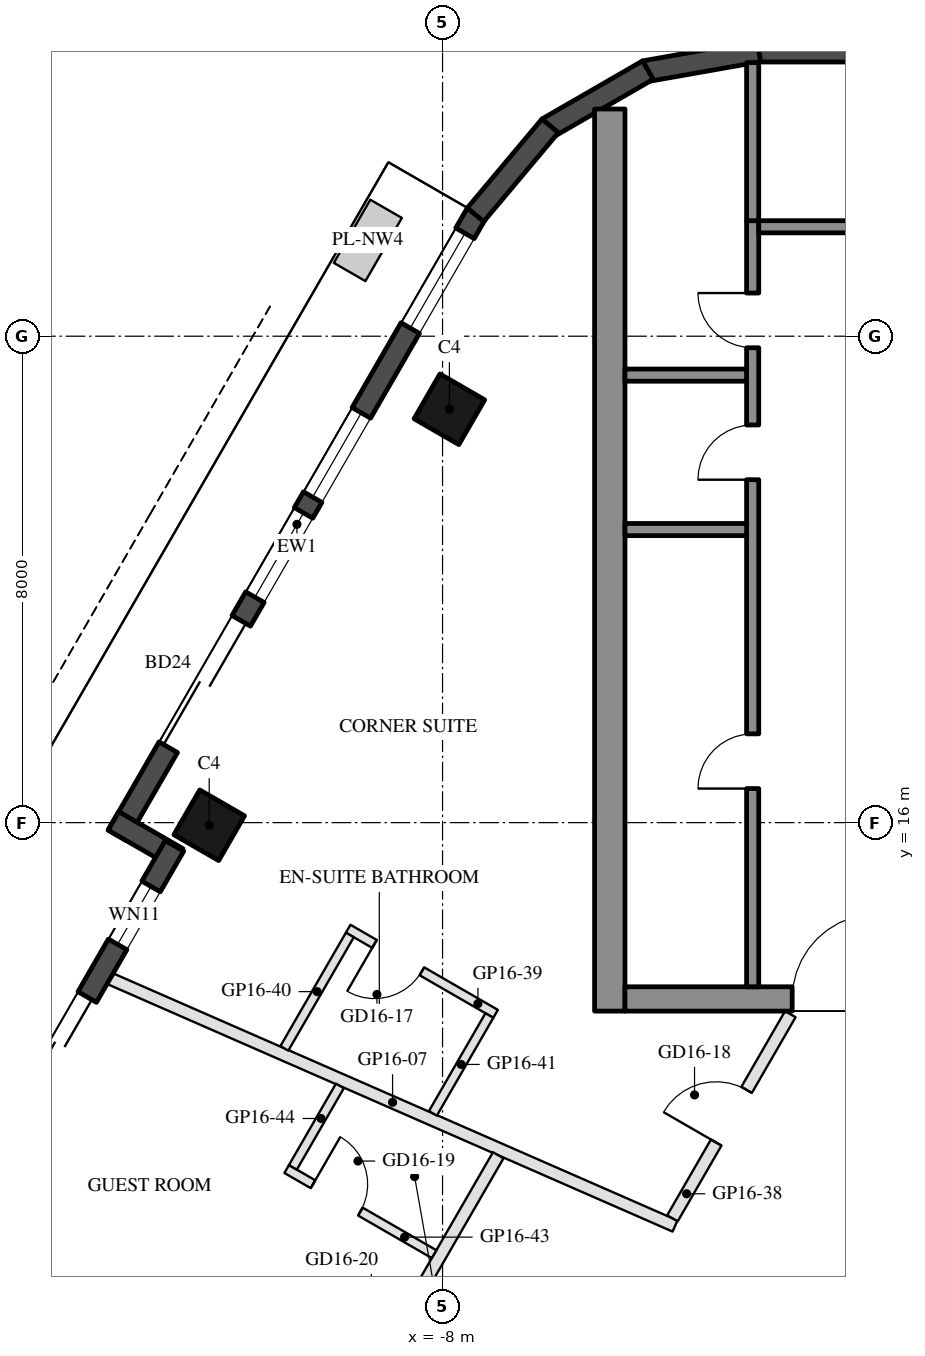
"""IFC4 building model, lengths in metres.
Left out: names, types, materials, properties, quantities, classifications, styles, units other than length and angle.
Written with IfcOpenShell. Run it as: python <this file> out.ifc"""

import sys

from ifc_helpers import new_model, si_unit, direction, frame, frame_2d, origin, origin_2d, place, context, subcontext, project, spatial, rectangle, hollow_rectangle, extrude, element, fill, save


model = new_model("IFC4")
c1 = context("Model", 3, precision=1e-05, world=origin(), true_north=direction((0.0, 1.0)))
c2 = subcontext(c1, "Body", "Model", "MODEL_VIEW")
j1 = project(units=[si_unit("LENGTHUNIT", "METRE"), si_unit("PLANEANGLEUNIT", "RADIAN")], contexts=[c1])
p1 = place(None, origin())
s1 = spatial("IfcSite", under=j1, at=p1, CompositionType="ELEMENT")
p2 = place(p1, origin())
s2 = spatial("IfcBuilding", under=s1, at=p2, CompositionType="ELEMENT")
p3 = place(p2, frame((0.0, 0.0, 179.9)))
s3 = spatial("IfcBuildingStorey", under=s2, at=p3, CompositionType="ELEMENT", Elevation=179.9)
for number, where, z_axis, x_axis in (
    (1, (-7.888, 22.798, 0.0), (0.0, 0.0, 1.0), (0.5, 0.866, 0.0)),
    (2, (-11.838, 15.957, 0.0), (0.0, 0.0, 1.0), (0.5, 0.866, 0.0)),
):
    element("IfcColumn", number, at=place(p3, frame(where, z_axis=z_axis, x_axis=x_axis)), inside=s3, PredefinedType="COLUMN", context=c2, shape_type="SweptSolid", body=[
        extrude(hollow_rectangle(XDim=0.85, YDim=0.85, WallThickness=0.04, at=origin_2d()), origin(), (0.0, 0.0, 1.0), 3.7),
    ])
p4 = place(p3, frame((-7.441, 26.022, 0.0), z_axis=(0.0, 0.0, 1.0), x_axis=(-0.499992533062, -0.86602971478, 0.0)))
e3 = element("IfcWall", 3, at=p4, inside=s3, PredefinedType="SOLIDWALL", context=c2, shape_type="SweptSolid", body=[
    extrude(rectangle(XDim=11.816, YDim=0.35, at=frame_2d((5.908, 0.0))), origin(), (0.0, 0.0, 1.0), 3.55),
])
p5 = place(p4, frame((0.381, 0.0, 0.3)))
e4 = element("IfcOpeningElement", 4, at=p5, cuts=e3, PredefinedType="OPENING", context=c2, shape_type="SweptSolid", body=[
    extrude(rectangle(XDim=1.8, YDim=2.65, at=frame_2d((0.9, 1.325))), frame((0.0, 0.185, 0.0), z_axis=(0.0, -1.0, 0.0), x_axis=(1.0, 0.0, 0.0)), (0.0, 0.0, 1.0), 0.37),
])
p6 = place(p4, frame((7.74, 0.0, 0.0)))
e5 = element("IfcOpeningElement", 5, at=p6, cuts=e3, PredefinedType="OPENING", context=c2, shape_type="SweptSolid", body=[
    extrude(rectangle(XDim=2.4, YDim=2.4, at=frame_2d((1.2, 1.2))), frame((0.0, 0.185, 0.0), z_axis=(0.0, -1.0, 0.0), x_axis=(1.0, 0.0, 0.0)), (0.0, 0.0, 1.0), 0.37),
])
p7 = place(p4, frame((3.791, 0.0, 0.3)))
e6 = element("IfcOpeningElement", 6, at=p7, cuts=e3, PredefinedType="OPENING", context=c2, shape_type="SweptSolid", body=[
    extrude(rectangle(XDim=1.6, YDim=2.65, at=frame_2d((0.8, 1.325))), frame((0.0, 0.185, 0.0), z_axis=(0.0, -1.0, 0.0), x_axis=(1.0, 0.0, 0.0)), (0.0, 0.0, 1.0), 0.37),
])
p8 = place(p4, frame((5.691, 0.0, 0.3)))
e7 = element("IfcOpeningElement", 7, at=p8, cuts=e3, PredefinedType="OPENING", context=c2, shape_type="SweptSolid", body=[
    extrude(rectangle(XDim=1.6, YDim=2.65, at=frame_2d((0.8, 1.325))), frame((0.0, 0.185, 0.0), z_axis=(0.0, -1.0, 0.0), x_axis=(1.0, 0.0, 0.0)), (0.0, 0.0, 1.0), 0.37),
])
p9 = place(p3, frame((-13.413, 16.029, 0.0), z_axis=(0.0, 0.0, 1.0), x_axis=(0.866005645448, -0.500034220881, 0.0)))
e8 = element("IfcWall", 8, at=p9, inside=s3, PredefinedType="SOLIDWALL", context=c2, shape_type="SweptSolid", body=[
    extrude(rectangle(XDim=1.22, YDim=0.35, at=frame_2d((0.61, 0.0))), origin(), (0.0, 0.0, 1.0), 3.55),
])
p10 = place(p3, frame((-12.409, 15.617, 0.0), z_axis=(0.0, 0.0, 1.0), x_axis=(-0.500003597184, -0.866023326939, 0.0)))
e9 = element("IfcWall", 9, at=p10, inside=s3, PredefinedType="SOLIDWALL", context=c2, shape_type="SweptSolid", body=[
    extrude(rectangle(XDim=6.74, YDim=0.35, at=frame_2d((3.37, 0.0))), origin(), (0.0, 0.0, 1.0), 3.55),
])
p11 = place(p10, frame((0.77, 0.0, 0.3)))
e10 = element("IfcOpeningElement", 10, at=p11, cuts=e9, PredefinedType="OPENING", context=c2, shape_type="SweptSolid", body=[
    extrude(rectangle(XDim=1.1, YDim=2.65, at=frame_2d((0.55, 1.325))), frame((0.0, 0.185, 0.0), z_axis=(0.0, -1.0, 0.0), x_axis=(1.0, 0.0, 0.0)), (0.0, 0.0, 1.0), 0.37),
])
p12 = place(p10, frame((2.87, 0.0, 0.0)))
e11 = element("IfcOpeningElement", 11, at=p12, cuts=e9, PredefinedType="OPENING", context=c2, shape_type="SweptSolid", body=[
    extrude(rectangle(XDim=1.8, YDim=2.4, at=frame_2d((0.9, 1.2))), frame((0.0, 0.185, 0.0), z_axis=(0.0, -1.0, 0.0), x_axis=(1.0, 0.0, 0.0)), (0.0, 0.0, 1.0), 0.37),
])
p13 = place(p10, frame((4.97, 0.0, 0.3)))
e12 = element("IfcOpeningElement", 12, at=p13, cuts=e9, PredefinedType="OPENING", context=c2, shape_type="SweptSolid", body=[
    extrude(rectangle(XDim=1.0, YDim=2.65, at=frame_2d((0.5, 1.325))), frame((0.0, 0.185, 0.0), z_axis=(0.0, -1.0, 0.0), x_axis=(1.0, 0.0, 0.0)), (0.0, 0.0, 1.0), 0.37),
])
p14 = place(p3, frame((2.829, 28.685, 0.0), z_axis=(0.0, 0.0, 1.0), x_axis=(-1.0, 0.0, 0.0)))
e13 = element("IfcWall", 13, at=p14, inside=s3, PredefinedType="SOLIDWALL", context=c2, shape_type="SweptSolid", body=[
    extrude(rectangle(XDim=5.658, YDim=0.35, at=frame_2d((2.829, 0.0))), origin(), (0.0, 0.0, 1.0), 3.55),
])
for number, where, z_axis, x_axis in (
    (14, (-2.799, 28.688, 0.0), (0.0, 0.0, 1.0), (-0.985, -0.174, 0.0)),
    (15, (-4.623, 28.377, 0.0), (0.0, 0.0, 1.0), (-0.866, -0.5, 0.0)),
):
    element("IfcWall", number, at=place(p3, frame(where, z_axis=z_axis, x_axis=x_axis)), inside=s3, PredefinedType="SOLIDWALL", context=c2, shape_type="SweptSolid", body=[
        extrude(rectangle(XDim=1.91, YDim=0.35, at=frame_2d((0.955, 0.0))), origin(), (0.0, 0.0, 1.0), 3.55),
    ])
p15 = place(p3, frame((-6.23, 27.461, 0.0), z_axis=(0.0, 0.0, 1.0), x_axis=(-0.642808304945, -0.766027077259, 0.0)))
e16 = element("IfcWall", 16, at=p15, inside=s3, PredefinedType="SOLIDWALL", context=c2, shape_type="SweptSolid", body=[
    extrude(rectangle(XDim=1.91, YDim=0.35, at=frame_2d((0.955, 0.0))), origin(), (0.0, 0.0, 1.0), 3.55),
])
p16 = place(p3, frame((-5.25, 12.9, 0.0), z_axis=(0.0, 0.0, 1.0), x_axis=(0.0, 1.0, 0.0)))
e17 = element("IfcWall", 17, at=p16, inside=s3, PredefinedType="SHEAR", context=c2, shape_type="SweptSolid", body=[
    extrude(rectangle(XDim=14.837, YDim=0.5, at=frame_2d((7.418, 0.0))), origin(), (0.0, 0.0, 1.0), 3.5),
])
p17 = place(p3, frame((5.0, 13.1, 0.0), z_axis=(0.0, 0.0, 1.0), x_axis=(-1.0, 0.0, 0.0)))
e18 = element("IfcWall", 18, at=p17, inside=s3, PredefinedType="SHEAR", context=c2, shape_type="SweptSolid", body=[
    extrude(rectangle(XDim=10.0, YDim=0.4, at=frame_2d((5.0, 0.0))), origin(), (0.0, 0.0, 1.0), 3.5),
])
p18 = place(p17, frame((3.55, 0.0, 0.0)))
e19 = element("IfcOpeningElement", 19, at=p18, cuts=e18, PredefinedType="OPENING", context=c2, shape_type="SweptSolid", body=[
    extrude(rectangle(XDim=1.1, YDim=2.1, at=frame_2d((0.55, 1.05))), frame((0.0, 0.21, 0.0), z_axis=(0.0, -1.0, 0.0), x_axis=(1.0, 0.0, 0.0)), (0.0, 0.0, 1.0), 0.42),
])
p19 = place(p17, frame((5.85, 0.0, 0.0)))
e20 = element("IfcOpeningElement", 20, at=p19, cuts=e18, PredefinedType="OPENING", context=c2, shape_type="SweptSolid", body=[
    extrude(rectangle(XDim=1.4, YDim=2.1, at=frame_2d((0.7, 1.05))), frame((0.0, 0.21, 0.0), z_axis=(0.0, -1.0, 0.0), x_axis=(1.0, 0.0, 0.0)), (0.0, 0.0, 1.0), 0.42),
])
p20 = place(p3, frame((-2.9, 13.3, 0.0), z_axis=(0.0, 0.0, 1.0), x_axis=(0.0, 1.0, 0.0)))
e21 = element("IfcWall", 21, at=p20, inside=s3, PredefinedType="SHEAR", context=c2, shape_type="SweptSolid", body=[
    extrude(rectangle(XDim=12.6, YDim=0.2, at=frame_2d((6.3, 0.0))), origin(), (0.0, 0.0, 1.0), 3.5),
])
p21 = place(p20, frame((3.26, 0.0, 0.0)))
e22 = element("IfcOpeningElement", 22, at=p21, cuts=e21, PredefinedType="OPENING", context=c2, shape_type="SweptSolid", body=[
    extrude(rectangle(XDim=0.9, YDim=2.1, at=frame_2d((0.45, 1.05))), frame((0.0, 0.11, 0.0), z_axis=(0.0, -1.0, 0.0), x_axis=(1.0, 0.0, 0.0)), (0.0, 0.0, 1.0), 0.22),
])
p22 = place(p20, frame((8.34, 0.0, 0.0)))
e23 = element("IfcOpeningElement", 23, at=p22, cuts=e21, PredefinedType="OPENING", context=c2, shape_type="SweptSolid", body=[
    extrude(rectangle(XDim=0.9, YDim=2.1, at=frame_2d((0.45, 1.05))), frame((0.0, 0.11, 0.0), z_axis=(0.0, -1.0, 0.0), x_axis=(1.0, 0.0, 0.0)), (0.0, 0.0, 1.0), 0.22),
])
p23 = place(p20, frame((10.51, 0.0, 0.0)))
e24 = element("IfcOpeningElement", 24, at=p23, cuts=e21, PredefinedType="OPENING", context=c2, shape_type="SweptSolid", body=[
    extrude(rectangle(XDim=0.9, YDim=2.1, at=frame_2d((0.45, 1.05))), frame((0.0, 0.11, 0.0), z_axis=(0.0, -1.0, 0.0), x_axis=(1.0, 0.0, 0.0)), (0.0, 0.0, 1.0), 0.22),
])
p24 = place(p3, frame((-0.4, 25.8, 0.0), z_axis=(0.0, 0.0, 1.0), x_axis=(-1.0, 0.0, 0.0)))
e25 = element("IfcWall", 25, at=p24, inside=s3, PredefinedType="SHEAR", context=c2, shape_type="SweptSolid", body=[
    extrude(rectangle(XDim=2.4, YDim=0.2, at=frame_2d((1.2, 0.0))), origin(), (0.0, 0.0, 1.0), 3.5),
])
for number, where, z_axis, x_axis in (
    (26, (-3.0, 20.82, 0.0), (0.0, 0.0, 1.0), (-1.0, 0.0, 0.0)),
    (27, (-3.0, 23.36, 0.0), (0.0, 0.0, 1.0), (-1.0, 0.0, 0.0)),
):
    element("IfcWall", number, at=place(p3, frame(where, z_axis=z_axis, x_axis=x_axis)), inside=s3, PredefinedType="SHEAR", context=c2, shape_type="SweptSolid", body=[
        extrude(rectangle(XDim=2.0, YDim=0.2, at=frame_2d((1.0, 0.0))), origin(), (0.0, 0.0, 1.0), 3.5),
    ])
p25 = place(p3, frame((-2.9, 25.9, 0.0), z_axis=(0.0, 0.0, 1.0), x_axis=(0.0, 1.0, 0.0)))
e28 = element("IfcWall", 28, at=p25, inside=s3, PredefinedType="SHEAR", context=c2, shape_type="SweptSolid", body=[
    extrude(rectangle(XDim=2.6, YDim=0.2, at=frame_2d((1.3, 0.0))), origin(), (0.0, 0.0, 1.0), 3.5),
])
p26 = place(p3, frame((-13.467, 13.434, 0.0), z_axis=(0.0, 0.0, 1.0), x_axis=(0.916026348045, -0.401118099426, 0.0)))
e29 = element("IfcWall", 29, at=p26, inside=s3, PredefinedType="PARTITIONING", context=c2, shape_type="SweptSolid", body=[
    extrude(rectangle(XDim=10.142, YDim=0.2, at=frame_2d((5.071, 0.0))), origin(), (0.0, 0.0, 1.0), 3.06),
])
p27 = place(p3, frame((-15.44, 8.867, 0.0), z_axis=(0.0, 0.0, 1.0), x_axis=(0.851787104886, -0.523888087237, 0.0)))
e30 = element("IfcWall", 30, at=p27, inside=s3, PredefinedType="PARTITIONING", context=c2, shape_type="SweptSolid", body=[
    extrude(rectangle(XDim=6.508, YDim=0.2, at=frame_2d((3.254, 0.0))), origin(), (0.0, 0.0, 1.0), 2.95),
])
p28 = place(p3, frame((-4.219, 9.493, 0.0), z_axis=(0.0, 0.0, 1.0), x_axis=(0.499993219391, 0.866029318535, 0.0)))
e31 = element("IfcWall", 31, at=p28, inside=s3, PredefinedType="PARTITIONING", context=c2, shape_type="SweptSolid", body=[
    extrude(rectangle(XDim=3.876, YDim=0.2, at=frame_2d((1.938, 0.0))), origin(), (0.0, 0.0, 1.0), 2.95),
])
p29 = place(p28, frame((1.438, 0.0, 0.0)))
e32 = element("IfcOpeningElement", 32, at=p29, cuts=e31, PredefinedType="OPENING", context=c2, shape_type="SweptSolid", body=[
    extrude(rectangle(XDim=1.0, YDim=2.1, at=frame_2d((0.5, 1.05))), frame((0.0, 0.11, 0.0), z_axis=(0.0, -1.0, 0.0), x_axis=(1.0, 0.0, 0.0)), (0.0, 0.0, 1.0), 0.22),
])
p30 = place(p3, frame((-7.127, 12.855, 0.0), z_axis=(0.0, 0.0, 1.0), x_axis=(-0.866018616679, 0.500011755427, 0.0)))
e33 = element("IfcWall", 33, at=p30, inside=s3, PredefinedType="PARTITIONING", context=c2, shape_type="SweptSolid", body=[
    extrude(rectangle(XDim=2.8, YDim=0.15, at=frame_2d((1.4, 0.0))), origin(), (0.0, 0.0, 1.0), 3.55),
])
p31 = place(p30, frame((1.4, 0.0, 0.0)))
e34 = element("IfcOpeningElement", 34, at=p31, cuts=e33, PredefinedType="OPENING", context=c2, shape_type="SweptSolid", body=[
    extrude(rectangle(XDim=0.9, YDim=2.1, at=frame_2d((0.45, 1.05))), frame((0.0, 0.085, 0.0), z_axis=(0.0, -1.0, 0.0), x_axis=(1.0, 0.0, 0.0)), (0.0, 0.0, 1.0), 0.17),
])
p32 = place(p3, frame((-9.525, 14.153, 0.0), z_axis=(0.0, 0.0, 1.0), x_axis=(-0.500016891966, -0.866015650984, 0.0)))
e35 = element("IfcWall", 35, at=p32, inside=s3, PredefinedType="PARTITIONING", context=c2, shape_type="SweptSolid", body=[
    extrude(rectangle(XDim=2.153, YDim=0.15, at=frame_2d((1.077, 0.0))), origin(), (0.0, 0.0, 1.0), 3.55),
])
p33 = place(p3, frame((-7.23, 12.828, 0.0), z_axis=(0.0, 0.0, 1.0), x_axis=(-0.500010545262, -0.866019315389, 0.0)))
e36 = element("IfcWall", 36, at=p33, inside=s3, PredefinedType="PARTITIONING", context=c2, shape_type="SweptSolid", body=[
    extrude(rectangle(XDim=1.858, YDim=0.15, at=frame_2d((0.929, 0.0))), origin(), (0.0, 0.0, 1.0), 3.55),
])
p34 = place(p3, frame((-9.932, 5.597, 0.0), z_axis=(0.0, 0.0, 1.0), x_axis=(0.500006916967, 0.866021410235, 0.0)))
e37 = element("IfcWall", 37, at=p34, inside=s3, PredefinedType="PARTITIONING", context=c2, shape_type="SweptSolid", body=[
    extrude(rectangle(XDim=5.696, YDim=0.2, at=frame_2d((2.848, 0.0))), origin(), (0.0, 0.0, 1.0), 2.95),
])
p35 = place(p34, frame((2.235, 0.0, 0.0)))
e38 = element("IfcOpeningElement", 38, at=p35, cuts=e37, PredefinedType="OPENING", context=c2, shape_type="SweptSolid", body=[
    extrude(rectangle(XDim=1.0, YDim=2.1, at=frame_2d((0.5, 1.05))), frame((0.0, 0.11, 0.0), z_axis=(0.0, -1.0, 0.0), x_axis=(1.0, 0.0, 0.0)), (0.0, 0.0, 1.0), 0.22),
])
p36 = place(p3, frame((-10.564, 10.303, 0.0), z_axis=(0.0, 0.0, 1.0), x_axis=(0.865996816683, -0.500049511043, 0.0)))
e39 = element("IfcWall", 39, at=p36, inside=s3, PredefinedType="PARTITIONING", context=c2, shape_type="SweptSolid", body=[
    extrude(rectangle(XDim=2.8, YDim=0.15, at=frame_2d((1.4, 0.0))), origin(), (0.0, 0.0, 1.0), 3.55),
])
p37 = place(p36, frame((0.5, 0.0, 0.0)))
e40 = element("IfcOpeningElement", 40, at=p37, cuts=e39, PredefinedType="OPENING", context=c2, shape_type="SweptSolid", body=[
    extrude(rectangle(XDim=0.9, YDim=2.1, at=frame_2d((0.45, 1.05))), frame((0.0, 0.085, 0.0), z_axis=(0.0, -1.0, 0.0), x_axis=(1.0, 0.0, 0.0)), (0.0, 0.0, 1.0), 0.17),
])
p38 = place(p3, frame((-9.688, 11.67, 0.0), z_axis=(0.0, 0.0, 1.0), x_axis=(-0.499890974144, -0.866088340742, 0.0)))
e41 = element("IfcWall", 41, at=p38, inside=s3, PredefinedType="PARTITIONING", context=c2, shape_type="SweptSolid", body=[
    extrude(rectangle(XDim=1.547, YDim=0.15, at=frame_2d((0.773, 0.0))), origin(), (0.0, 0.0, 1.0), 2.95),
])
p39 = place(p5, origin())
e42 = element("IfcWindow", 42, at=p39, inside=s3, PartitioningType="SINGLE_PANEL", PredefinedType="WINDOW", context=c2, shape_type="SweptSolid", body=[
    extrude(rectangle(XDim=1.8, YDim=2.65, at=frame_2d((0.9, 1.325))), frame((0.0, 0.03, 0.0), z_axis=(0.0, -1.0, 0.0), x_axis=(1.0, 0.0, 0.0)), (0.0, 0.0, 1.0), 0.06),
])
fill(e4, e42)
p40 = place(p6, frame((2.4, 0.0, 0.0), z_axis=(0.0, 0.0, 1.0), x_axis=(-1.0, 0.0, 0.0)))
e43 = element("IfcDoor", 43, at=p40, inside=s3, OperationType="SLIDING_TO_LEFT", PredefinedType="DOOR", context=c2, shape_type="SweptSolid", body=[
    extrude(rectangle(XDim=2.4, YDim=2.4, at=frame_2d((1.2, 1.2))), frame((0.0, 0.025, 0.0), z_axis=(0.0, -1.0, 0.0), x_axis=(1.0, 0.0, 0.0)), (0.0, 0.0, 1.0), 0.05),
])
fill(e5, e43)
p41 = place(p7, origin())
e44 = element("IfcWindow", 44, at=p41, inside=s3, PartitioningType="SINGLE_PANEL", PredefinedType="WINDOW", context=c2, shape_type="SweptSolid", body=[
    extrude(rectangle(XDim=1.6, YDim=2.65, at=frame_2d((0.8, 1.325))), frame((0.0, 0.03, 0.0), z_axis=(0.0, -1.0, 0.0), x_axis=(1.0, 0.0, 0.0)), (0.0, 0.0, 1.0), 0.06),
])
fill(e6, e44)
p42 = place(p8, origin())
e45 = element("IfcWindow", 45, at=p42, inside=s3, PartitioningType="SINGLE_PANEL", PredefinedType="WINDOW", context=c2, shape_type="SweptSolid", body=[
    extrude(rectangle(XDim=1.6, YDim=2.65, at=frame_2d((0.8, 1.325))), frame((0.0, 0.03, 0.0), z_axis=(0.0, -1.0, 0.0), x_axis=(1.0, 0.0, 0.0)), (0.0, 0.0, 1.0), 0.06),
])
fill(e7, e45)
p43 = place(p11, origin())
e46 = element("IfcWindow", 46, at=p43, inside=s3, PartitioningType="SINGLE_PANEL", PredefinedType="WINDOW", context=c2, shape_type="SweptSolid", body=[
    extrude(rectangle(XDim=1.1, YDim=2.65, at=frame_2d((0.55, 1.325))), frame((0.0, 0.03, 0.0), z_axis=(0.0, -1.0, 0.0), x_axis=(1.0, 0.0, 0.0)), (0.0, 0.0, 1.0), 0.06),
])
fill(e10, e46)
p44 = place(p12, frame((1.8, 0.0, 0.0), z_axis=(0.0, 0.0, 1.0), x_axis=(-1.0, 0.0, 0.0)))
e47 = element("IfcDoor", 47, at=p44, inside=s3, OperationType="SLIDING_TO_LEFT", PredefinedType="DOOR", context=c2, shape_type="SweptSolid", body=[
    extrude(rectangle(XDim=1.8, YDim=2.4, at=frame_2d((0.9, 1.2))), frame((0.0, 0.025, 0.0), z_axis=(0.0, -1.0, 0.0), x_axis=(1.0, 0.0, 0.0)), (0.0, 0.0, 1.0), 0.05),
])
fill(e11, e47)
p45 = place(p21, origin())
e48 = element("IfcDoor", 48, at=p45, inside=s3, OperationType="SINGLE_SWING_LEFT", PredefinedType="DOOR", context=c2, shape_type="SweptSolid", body=[
    extrude(rectangle(XDim=0.9, YDim=2.1, at=frame_2d((0.45, 1.05))), frame((0.0, 0.025, 0.0), z_axis=(0.0, -1.0, 0.0), x_axis=(1.0, 0.0, 0.0)), (0.0, 0.0, 1.0), 0.05),
])
fill(e22, e48)
p46 = place(p22, origin())
e49 = element("IfcDoor", 49, at=p46, inside=s3, OperationType="SINGLE_SWING_LEFT", PredefinedType="DOOR", context=c2, shape_type="SweptSolid", body=[
    extrude(rectangle(XDim=0.9, YDim=2.1, at=frame_2d((0.45, 1.05))), frame((0.0, 0.025, 0.0), z_axis=(0.0, -1.0, 0.0), x_axis=(1.0, 0.0, 0.0)), (0.0, 0.0, 1.0), 0.05),
])
fill(e23, e49)
p47 = place(p23, origin())
e50 = element("IfcDoor", 50, at=p47, inside=s3, OperationType="SINGLE_SWING_RIGHT", PredefinedType="DOOR", context=c2, shape_type="SweptSolid", body=[
    extrude(rectangle(XDim=0.9, YDim=2.1, at=frame_2d((0.45, 1.05))), frame((0.0, 0.025, 0.0), z_axis=(0.0, -1.0, 0.0), x_axis=(1.0, 0.0, 0.0)), (0.0, 0.0, 1.0), 0.05),
])
fill(e24, e50)
p48 = place(p19, frame((1.4, 0.0, 0.0), z_axis=(0.0, 0.0, 1.0), x_axis=(-1.0, 0.0, 0.0)))
e51 = element("IfcDoor", 51, at=p48, inside=s3, OperationType="DOUBLE_DOOR_SINGLE_SWING", PredefinedType="DOOR", context=c2, shape_type="SweptSolid", body=[
    extrude(rectangle(XDim=1.4, YDim=2.1, at=frame_2d((0.7, 1.05))), frame((0.0, 0.025, 0.0), z_axis=(0.0, -1.0, 0.0), x_axis=(1.0, 0.0, 0.0)), (0.0, 0.0, 1.0), 0.05),
])
fill(e20, e51)
p49 = place(p31, origin())
e52 = element("IfcDoor", 52, at=p49, inside=s3, OperationType="SINGLE_SWING_RIGHT", PredefinedType="DOOR", context=c2, shape_type="SweptSolid", body=[
    extrude(rectangle(XDim=0.9, YDim=2.1, at=frame_2d((0.45, 1.05))), frame((0.0, 0.025, 0.0), z_axis=(0.0, -1.0, 0.0), x_axis=(1.0, 0.0, 0.0)), (0.0, 0.0, 1.0), 0.05),
])
fill(e34, e52)
p50 = place(p29, origin())
e53 = element("IfcDoor", 53, at=p50, inside=s3, OperationType="SINGLE_SWING_LEFT", PredefinedType="DOOR", context=c2, shape_type="SweptSolid", body=[
    extrude(rectangle(XDim=1.0, YDim=2.1, at=frame_2d((0.5, 1.05))), frame((0.0, 0.025, 0.0), z_axis=(0.0, -1.0, 0.0), x_axis=(1.0, 0.0, 0.0)), (0.0, 0.0, 1.0), 0.05),
])
fill(e32, e53)
p51 = place(p37, origin())
e54 = element("IfcDoor", 54, at=p51, inside=s3, OperationType="SINGLE_SWING_LEFT", PredefinedType="DOOR", context=c2, shape_type="SweptSolid", body=[
    extrude(rectangle(XDim=0.9, YDim=2.1, at=frame_2d((0.45, 1.05))), frame((0.0, 0.025, 0.0), z_axis=(0.0, -1.0, 0.0), x_axis=(1.0, 0.0, 0.0)), (0.0, 0.0, 1.0), 0.05),
])
fill(e40, e54)
save(model, sys.argv[1])
